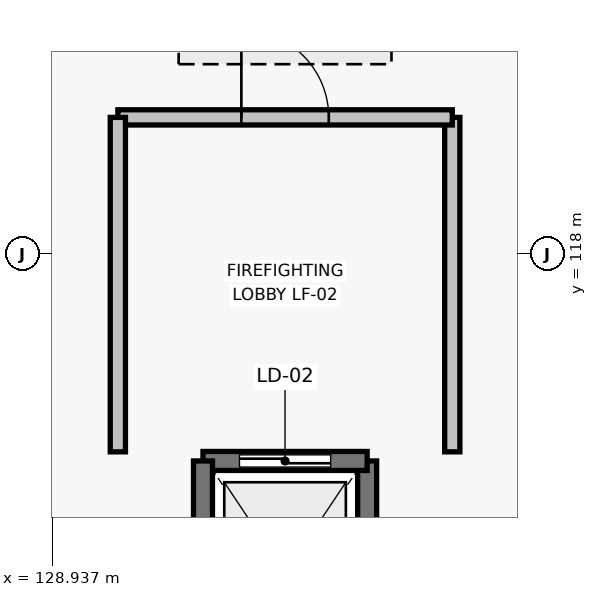
"""IFC4 building model, lengths in metres.
Left out: names, types, materials, properties, quantities, classifications, styles, units other than length and angle.
Written with IfcOpenShell. Run it as: python <this file> out.ifc"""

import sys

from ifc_helpers import new_model, si_unit, direction, frame, frame_2d, origin, origin_2d, place, context, subcontext, project, spatial, rectangle, extrude, element, fill, save


model = new_model("IFC4")
c1 = context("Model", 3, precision=1e-05, world=origin(), true_north=direction((0.0, 1.0)))
c2 = subcontext(c1, "Body", "Model", "MODEL_VIEW")
j1 = project(units=[si_unit("LENGTHUNIT", "METRE"), si_unit("PLANEANGLEUNIT", "RADIAN")], contexts=[c1])
p1 = place(None, origin())
s1 = spatial("IfcSite", under=j1, at=p1, CompositionType="ELEMENT")
p2 = place(p1, origin())
s2 = spatial("IfcBuilding", under=s1, at=p2, CompositionType="ELEMENT")
p3 = place(p2, frame((0.0, 0.0, 24.9)))
s3 = spatial("IfcBuildingStorey", under=s2, at=p3, CompositionType="ELEMENT", Elevation=24.9)
p4 = place(p3, frame((133.08, 112.32, 0.0), z_axis=(0.0, 0.0, 1.0), x_axis=(0.0, 1.0, 0.0)))
e1 = element("IfcWall", 1, at=p4, inside=s3, PredefinedType="SHEAR", context=c2, shape_type="SweptSolid", body=[
    extrude(rectangle(XDim=2.96, YDim=0.25, at=frame_2d((1.48, 0.0))), origin(), (0.0, 0.0, 1.0), 3.695),
])
p5 = place(p3, frame((133.08, 115.28, 0.0), z_axis=(0.0, 0.0, 1.0), x_axis=(-1.0, 0.0, 0.0)))
e2 = element("IfcWall", 2, at=p5, inside=s3, PredefinedType="SHEAR", context=c2, shape_type="SweptSolid", body=[
    extrude(rectangle(XDim=2.16, YDim=0.25, at=frame_2d((1.08, 0.0))), origin(), (0.0, 0.0, 1.0), 3.695),
])
p6 = place(p5, frame((0.48, 0.0, 0.0)))
e3 = element("IfcOpeningElement", 3, at=p6, cuts=e2, PredefinedType="OPENING", context=c2, shape_type="SweptSolid", body=[
    extrude(rectangle(XDim=1.2, YDim=2.2, at=frame_2d((0.6, 1.1))), frame((0.0, 0.135, 0.0), z_axis=(0.0, -1.0, 0.0), x_axis=(1.0, 0.0, 0.0)), (0.0, 0.0, 1.0), 0.27),
])
p7 = place(p3, frame((130.92, 115.28, 0.0), z_axis=(0.0, 0.0, 1.0), x_axis=(0.0, -1.0, 0.0)))
e4 = element("IfcWall", 4, at=p7, inside=s3, PredefinedType="SHEAR", context=c2, shape_type="SweptSolid", body=[
    extrude(rectangle(XDim=2.96, YDim=0.25, at=frame_2d((1.48, 0.0))), origin(), (0.0, 0.0, 1.0), 3.695),
])
p8 = place(p3, frame((134.2, 115.4, 0.0), z_axis=(0.0, 0.0, 1.0), x_axis=(0.0, 1.0, 0.0)))
e5 = element("IfcWall", 5, at=p8, inside=s3, PredefinedType="PARTITIONING", context=c2, shape_type="SweptSolid", body=[
    extrude(rectangle(XDim=4.4, YDim=0.2, at=frame_2d((2.2, 0.0))), origin(), (0.0, 0.0, 1.0), 3.36),
])
p9 = place(p3, frame((134.2, 119.8, 0.0), z_axis=(0.0, 0.0, 1.0), x_axis=(-1.0, 0.0, 0.0)))
e6 = element("IfcWall", 6, at=p9, inside=s3, PredefinedType="PARTITIONING", context=c2, shape_type="SweptSolid", body=[
    extrude(rectangle(XDim=4.4, YDim=0.2, at=frame_2d((2.2, 0.0))), origin(), (0.0, 0.0, 1.0), 3.695),
])
p10 = place(p9, frame((1.625, 0.0, 0.0)))
e7 = element("IfcOpeningElement", 7, at=p10, cuts=e6, PredefinedType="OPENING", context=c2, shape_type="SweptSolid", body=[
    extrude(rectangle(XDim=1.15, YDim=2.2, at=frame_2d((0.575, 1.1))), frame((0.0, 0.11, 0.0), z_axis=(0.0, -1.0, 0.0), x_axis=(1.0, 0.0, 0.0)), (0.0, 0.0, 1.0), 0.22),
])
p11 = place(p3, frame((129.8, 119.8, 0.0), z_axis=(0.0, 0.0, 1.0), x_axis=(0.0, -1.0, 0.0)))
e8 = element("IfcWall", 8, at=p11, inside=s3, PredefinedType="PARTITIONING", context=c2, shape_type="SweptSolid", body=[
    extrude(rectangle(XDim=4.4, YDim=0.2, at=frame_2d((2.2, 0.0))), origin(), (0.0, 0.0, 1.0), 3.695),
])
p12 = place(p2, frame((0.0, 0.0, 28.8)))
p13 = place(p12, frame((0.0, 0.0, -0.205)))
p14 = place(p13, frame((132.0, 121.5, 0.0)))
p15 = place(p14, frame((0.0, 0.0, 0.155)))
e9 = element("IfcWindow", 9, at=p15, inside=s3, PartitioningType="SINGLE_PANEL", PredefinedType="SKYLIGHT", context=c2, shape_type="SweptSolid", body=[
    extrude(rectangle(XDim=2.8, YDim=2.0, at=origin_2d()), origin(), (0.0, 0.0, 1.0), 0.05),
])
p16 = place(p6, origin())
e10 = element("IfcDoor", 10, at=p16, inside=s3, OperationType="SLIDING_TO_LEFT", PredefinedType="DOOR", context=c2, shape_type="SweptSolid", body=[
    extrude(rectangle(XDim=1.2, YDim=2.2, at=frame_2d((0.6, 1.1))), frame((0.0, 0.025, 0.0), z_axis=(0.0, -1.0, 0.0), x_axis=(1.0, 0.0, 0.0)), (0.0, 0.0, 1.0), 0.05),
])
fill(e3, e10)
p17 = place(p10, origin())
e11 = element("IfcDoor", 11, at=p17, inside=s3, OperationType="SINGLE_SWING_RIGHT", PredefinedType="DOOR", context=c2, shape_type="SweptSolid", body=[
    extrude(rectangle(XDim=1.15, YDim=2.2, at=frame_2d((0.575, 1.1))), frame((0.0, 0.025, 0.0), z_axis=(0.0, -1.0, 0.0), x_axis=(1.0, 0.0, 0.0)), (0.0, 0.0, 1.0), 0.05),
])
fill(e7, e11)
save(model, sys.argv[1])
